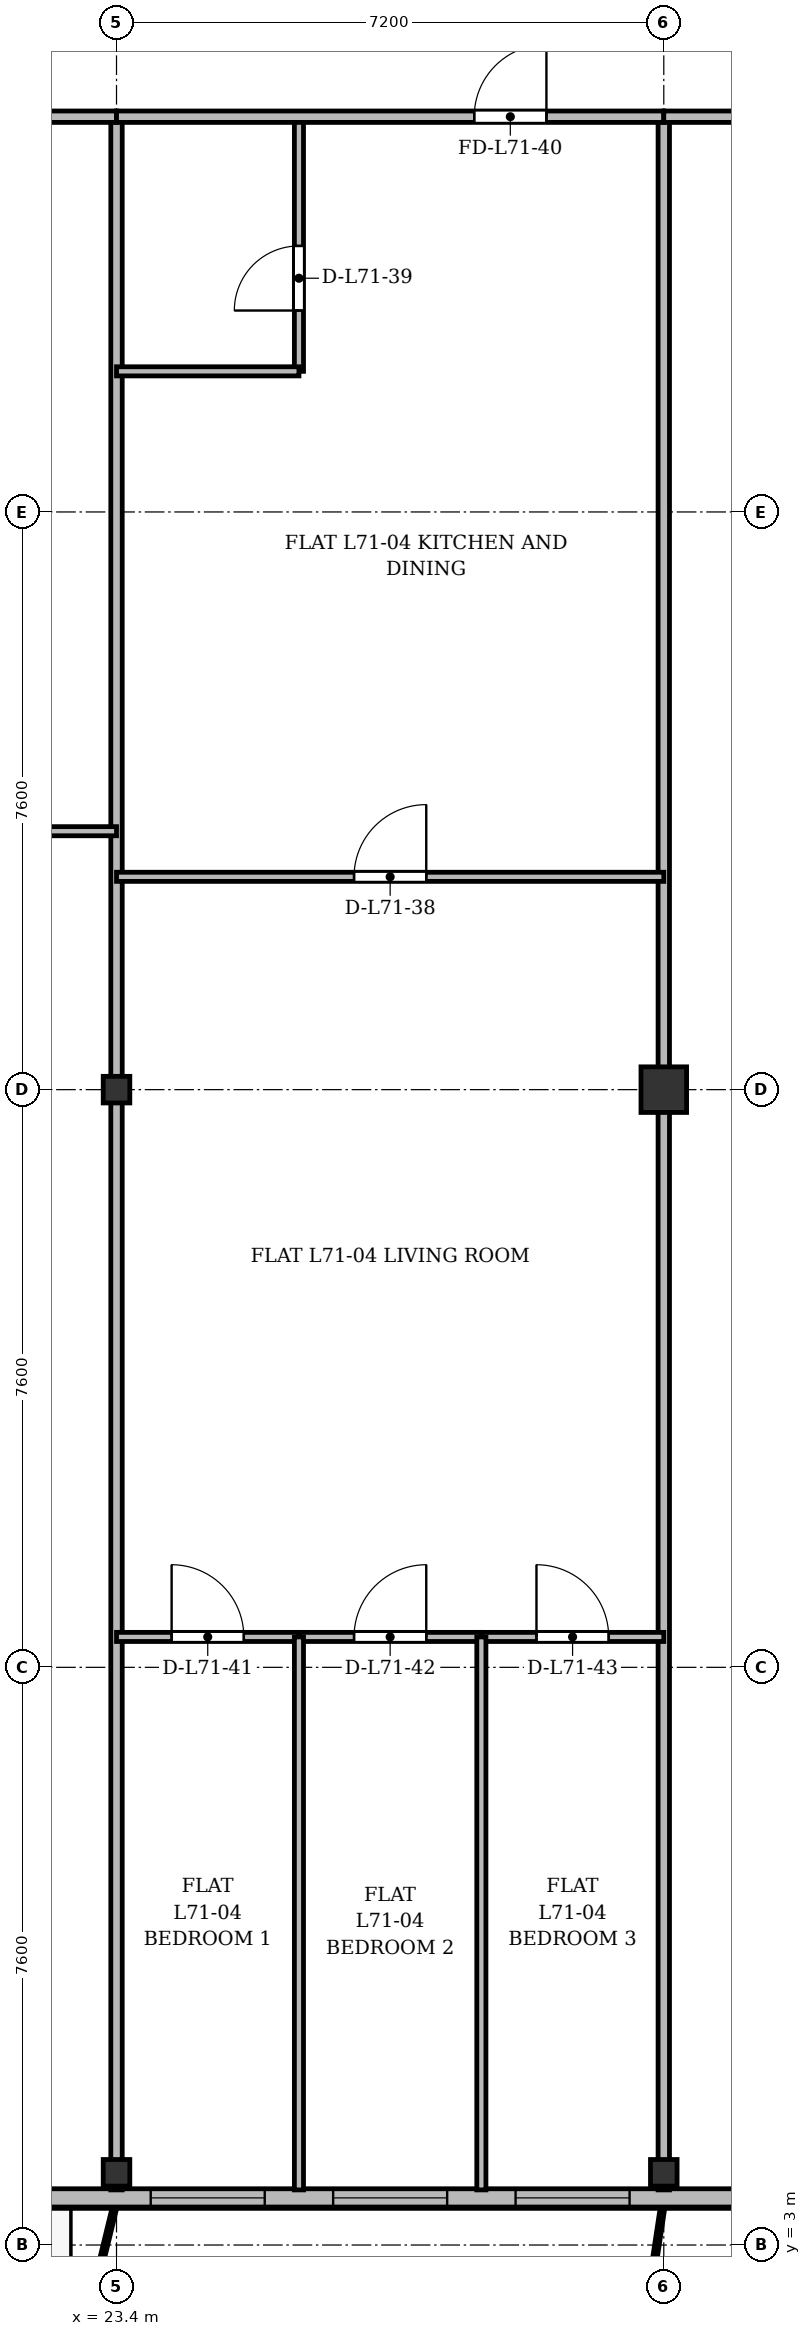
"""IFC4 building model, lengths in metres.
Left out: names, types, materials, properties, quantities, classifications, styles, units other than length and angle.
Written with IfcOpenShell. Run it as: python <this file> out.ifc"""

import sys

from ifc_helpers import new_model, si_unit, direction, frame, frame_2d, origin, origin_2d, place, context, subcontext, project, spatial, rectangle, i_section, extrude, source, transform, mapped, element, fill, save


model = new_model("IFC4")
c1 = context("Model", 3, precision=1e-05, world=origin(), true_north=direction((0.0, 1.0)))
c2 = subcontext(c1, "Body", "Model", "MODEL_VIEW")
j1 = project(units=[si_unit("LENGTHUNIT", "METRE"), si_unit("PLANEANGLEUNIT", "RADIAN")], contexts=[c1])
p1 = place(None, origin())
s1 = spatial("IfcSite", under=j1, at=p1, CompositionType="ELEMENT")
p2 = place(p1, origin())
s2 = spatial("IfcBuilding", under=s1, at=p2, CompositionType="ELEMENT")
p3 = place(p2, frame((0.0, 0.0, 273.9)))
s3 = spatial("IfcBuildingStorey", under=s2, at=p3, CompositionType="ELEMENT", Elevation=273.9)
m1 = source(origin(), c2, "Body", "SweptSolid", [
    extrude(i_section(OverallWidth=0.35, OverallDepth=0.35, WebThickness=0.018, FlangeThickness=0.028, at=origin_2d()), origin(), (0.0, 0.0, 1.0), 3.6),
])
for number, where, z_axis, x_axis in (
    (1, (23.4, 3.95, 0.0), (0.0, 0.0, 1.0), (1.0, 0.0, 0.0)),
    (2, (23.4, 18.2, 0.0), (0.0, 0.0, 1.0), (1.0, 0.0, 0.0)),
    (3, (30.6, 3.95, 0.0), (0.0, 0.0, 1.0), (1.0, 0.0, 0.0)),
):
    element("IfcColumn", number, at=place(p3, frame(where, z_axis=z_axis, x_axis=x_axis)), inside=s3, PredefinedType="COLUMN", context=c2, shape_type="MappedRepresentation", body=[
        mapped(m1, transform((0.0, 0.0, 0.0), x_axis=(1.0, 0.0, 0.0), y_axis=(0.0, 1.0, 0.0), z_axis=(0.0, 0.0, 1.0), scale=1.0)),
    ])
m2 = source(origin(), c2, "Body", "SweptSolid", [
    extrude(rectangle(XDim=0.6, YDim=0.6, at=origin_2d()), origin(), (0.0, 0.0, 1.0), 3.6),
])
p4 = place(p3, frame((30.6, 18.2, 0.0), z_axis=(0.0, 0.0, 1.0), x_axis=(1.0, 0.0, 0.0)))
e4 = element("IfcColumn", 4, at=p4, inside=s3, PredefinedType="COLUMN", context=c2, shape_type="MappedRepresentation", body=[
    mapped(m2, transform((0.0, 0.0, 0.0), x_axis=(1.0, 0.0, 0.0), y_axis=(0.0, 1.0, 0.0), z_axis=(0.0, 0.0, 1.0), scale=1.0)),
])
p5 = place(p3, frame((63.2, 3.62, 0.0), z_axis=(0.0, 0.0, 1.0), x_axis=(-1.0, 0.0, 0.0)))
e5 = element("IfcWall", 5, at=p5, inside=s3, PredefinedType="SOLIDWALL", context=c2, shape_type="SweptSolid", body=[
    extrude(rectangle(XDim=52.0, YDim=0.24, at=frame_2d((26.0, 0.0))), origin(), (0.0, 0.0, 1.0), 3.37),
])
p6 = place(p5, frame((1.145, 0.0, 0.9)))
e6 = element("IfcOpeningElement", 6, at=p6, cuts=e5, PredefinedType="OPENING", context=c2, shape_type="SweptSolid", body=[
    extrude(rectangle(XDim=2.2, YDim=1.8, at=frame_2d((1.1, 0.9))), frame((0.0, 0.13, 0.0), z_axis=(0.0, -1.0, 0.0), x_axis=(1.0, 0.0, 0.0)), (0.0, 0.0, 1.0), 0.26),
])
p7 = place(p5, frame((5.45, 0.0, 0.9)))
e7 = element("IfcOpeningElement", 7, at=p7, cuts=e5, PredefinedType="OPENING", context=c2, shape_type="SweptSolid", body=[
    extrude(rectangle(XDim=1.5, YDim=1.75, at=frame_2d((0.75, 0.875))), frame((0.0, 0.13, 0.0), z_axis=(0.0, -1.0, 0.0), x_axis=(1.0, 0.0, 0.0)), (0.0, 0.0, 1.0), 0.26),
])
p8 = place(p5, frame((9.1, 0.0, 0.9)))
e8 = element("IfcOpeningElement", 8, at=p8, cuts=e5, PredefinedType="OPENING", context=c2, shape_type="SweptSolid", body=[
    extrude(rectangle(XDim=2.0, YDim=1.95, at=frame_2d((1.0, 0.975))), frame((0.0, 0.13, 0.0), z_axis=(0.0, -1.0, 0.0), x_axis=(1.0, 0.0, 0.0)), (0.0, 0.0, 1.0), 0.26),
])
p9 = place(p5, frame((14.017, 0.0, 0.0)))
e9 = element("IfcOpeningElement", 9, at=p9, cuts=e5, PredefinedType="OPENING", context=c2, shape_type="SweptSolid", body=[
    extrude(rectangle(XDim=1.2, YDim=2.2, at=frame_2d((0.6, 1.1))), frame((0.0, 0.13, 0.0), z_axis=(0.0, -1.0, 0.0), x_axis=(1.0, 0.0, 0.0)), (0.0, 0.0, 1.0), 0.26),
])
p10 = place(p5, frame((25.1, 0.0, 0.9)))
e10 = element("IfcOpeningElement", 10, at=p10, cuts=e5, PredefinedType="OPENING", context=c2, shape_type="SweptSolid", body=[
    extrude(rectangle(XDim=1.8, YDim=1.8, at=frame_2d((0.9, 0.9))), frame((0.0, 0.13, 0.0), z_axis=(0.0, -1.0, 0.0), x_axis=(1.0, 0.0, 0.0)), (0.0, 0.0, 1.0), 0.26),
])
p11 = place(p5, frame((33.05, 0.0, 0.9)))
e11 = element("IfcOpeningElement", 11, at=p11, cuts=e5, PredefinedType="OPENING", context=c2, shape_type="SweptSolid", body=[
    extrude(rectangle(XDim=1.5, YDim=1.75, at=frame_2d((0.75, 0.875))), frame((0.0, 0.13, 0.0), z_axis=(0.0, -1.0, 0.0), x_axis=(1.0, 0.0, 0.0)), (0.0, 0.0, 1.0), 0.26),
])
p12 = place(p5, frame((35.45, 0.0, 0.9)))
e12 = element("IfcOpeningElement", 12, at=p12, cuts=e5, PredefinedType="OPENING", context=c2, shape_type="SweptSolid", body=[
    extrude(rectangle(XDim=1.5, YDim=1.75, at=frame_2d((0.75, 0.875))), frame((0.0, 0.13, 0.0), z_axis=(0.0, -1.0, 0.0), x_axis=(1.0, 0.0, 0.0)), (0.0, 0.0, 1.0), 0.26),
])
p13 = place(p5, frame((37.85, 0.0, 0.9)))
e13 = element("IfcOpeningElement", 13, at=p13, cuts=e5, PredefinedType="OPENING", context=c2, shape_type="SweptSolid", body=[
    extrude(rectangle(XDim=1.5, YDim=1.75, at=frame_2d((0.75, 0.875))), frame((0.0, 0.13, 0.0), z_axis=(0.0, -1.0, 0.0), x_axis=(1.0, 0.0, 0.0)), (0.0, 0.0, 1.0), 0.26),
])
p14 = place(p5, frame((41.452, 0.0, 0.0)))
e14 = element("IfcOpeningElement", 14, at=p14, cuts=e5, PredefinedType="OPENING", context=c2, shape_type="SweptSolid", body=[
    extrude(rectangle(XDim=1.2, YDim=2.2, at=frame_2d((0.6, 1.1))), frame((0.0, 0.13, 0.0), z_axis=(0.0, -1.0, 0.0), x_axis=(1.0, 0.0, 0.0)), (0.0, 0.0, 1.0), 0.26),
])
p15 = place(p5, frame((44.5, 0.0, 0.9)))
e15 = element("IfcOpeningElement", 15, at=p15, cuts=e5, PredefinedType="OPENING", context=c2, shape_type="SweptSolid", body=[
    extrude(rectangle(XDim=1.8, YDim=1.8, at=frame_2d((0.9, 0.9))), frame((0.0, 0.13, 0.0), z_axis=(0.0, -1.0, 0.0), x_axis=(1.0, 0.0, 0.0)), (0.0, 0.0, 1.0), 0.26),
])
p16 = place(p5, frame((48.655, 0.0, 0.9)))
e16 = element("IfcOpeningElement", 16, at=p16, cuts=e5, PredefinedType="OPENING", context=c2, shape_type="SweptSolid", body=[
    extrude(rectangle(XDim=2.2, YDim=1.8, at=frame_2d((1.1, 0.9))), frame((0.0, 0.13, 0.0), z_axis=(0.0, -1.0, 0.0), x_axis=(1.0, 0.0, 0.0)), (0.0, 0.0, 1.0), 0.26),
])
for number, where, z_axis, x_axis in (
    (17, (23.4, 3.725, 0.0), (0.0, 0.0, 1.0), (0.0, 1.0, 0.0)),
    (18, (30.6, 3.725, 0.0), (0.0, 0.0, 1.0), (0.0, 1.0, 0.0)),
):
    element("IfcWall", number, at=place(p3, frame(where, z_axis=z_axis, x_axis=x_axis)), inside=s3, PredefinedType="PARTITIONING", context=c2, shape_type="SweptSolid", body=[
        extrude(rectangle(XDim=27.275, YDim=0.15, at=frame_2d((13.637, 0.0))), origin(), (0.0, 0.0, 1.0), 2.87),
    ])
p17 = place(p3, frame((20.0, 31.0, 0.0), z_axis=(0.0, 0.0, 1.0), x_axis=(1.0, 0.0, 0.0)))
e19 = element("IfcWall", 19, at=p17, inside=s3, PredefinedType="PARTITIONING", context=c2, shape_type="SweptSolid", body=[
    extrude(rectangle(XDim=3.4, YDim=0.15, at=frame_2d((1.7, 0.0))), origin(), (0.0, 0.0, 1.0), 2.87),
])
p18 = place(p17, frame((1.131, 0.0, 0.0)))
e20 = element("IfcOpeningElement", 20, at=p18, cuts=e19, PredefinedType="OPENING", context=c2, shape_type="SweptSolid", body=[
    extrude(rectangle(XDim=0.95, YDim=2.15, at=frame_2d((0.475, 1.075))), frame((0.0, 0.085, 0.0), z_axis=(0.0, -1.0, 0.0), x_axis=(1.0, 0.0, 0.0)), (0.0, 0.0, 1.0), 0.17),
])
p19 = place(p3, frame((20.0, 21.6, 0.0), z_axis=(0.0, 0.0, 1.0), x_axis=(1.0, 0.0, 0.0)))
e21 = element("IfcWall", 21, at=p19, inside=s3, PredefinedType="PARTITIONING", context=c2, shape_type="SweptSolid", body=[
    extrude(rectangle(XDim=3.4, YDim=0.12, at=frame_2d((1.7, 0.0))), origin(), (0.0, 0.0, 1.0), 2.87),
])
p20 = place(p19, frame((1.131, 0.0, 0.0)))
e22 = element("IfcOpeningElement", 22, at=p20, cuts=e21, PredefinedType="OPENING", context=c2, shape_type="SweptSolid", body=[
    extrude(rectangle(XDim=0.95, YDim=2.15, at=frame_2d((0.475, 1.075))), frame((0.0, 0.07, 0.0), z_axis=(0.0, -1.0, 0.0), x_axis=(1.0, 0.0, 0.0)), (0.0, 0.0, 1.0), 0.14),
])
p21 = place(p3, frame((23.4, 21.0, 0.0), z_axis=(0.0, 0.0, 1.0), x_axis=(1.0, 0.0, 0.0)))
e23 = element("IfcWall", 23, at=p21, inside=s3, PredefinedType="PARTITIONING", context=c2, shape_type="SweptSolid", body=[
    extrude(rectangle(XDim=7.2, YDim=0.12, at=frame_2d((3.6, 0.0))), origin(), (0.0, 0.0, 1.0), 2.87),
])
p22 = place(p21, frame((3.125, 0.0, 0.0)))
e24 = element("IfcOpeningElement", 24, at=p22, cuts=e23, PredefinedType="OPENING", context=c2, shape_type="SweptSolid", body=[
    extrude(rectangle(XDim=0.95, YDim=2.15, at=frame_2d((0.475, 1.075))), frame((0.0, 0.07, 0.0), z_axis=(0.0, -1.0, 0.0), x_axis=(1.0, 0.0, 0.0)), (0.0, 0.0, 1.0), 0.14),
])
p23 = place(p3, frame((25.8, 27.65, 0.0), z_axis=(0.0, 0.0, 1.0), x_axis=(0.0, 1.0, 0.0)))
e25 = element("IfcWall", 25, at=p23, inside=s3, PredefinedType="PARTITIONING", context=c2, shape_type="SweptSolid", body=[
    extrude(rectangle(XDim=3.35, YDim=0.12, at=frame_2d((1.675, 0.0))), origin(), (0.0, 0.0, 1.0), 3.37),
])
p24 = place(p23, frame((0.8, 0.0, 0.0)))
e26 = element("IfcOpeningElement", 26, at=p24, cuts=e25, PredefinedType="OPENING", context=c2, shape_type="SweptSolid", body=[
    extrude(rectangle(XDim=0.85, YDim=2.1, at=frame_2d((0.425, 1.05))), frame((0.0, 0.07, 0.0), z_axis=(0.0, -1.0, 0.0), x_axis=(1.0, 0.0, 0.0)), (0.0, 0.0, 1.0), 0.14),
])
p25 = place(p3, frame((23.4, 27.65, 0.0), z_axis=(0.0, 0.0, 1.0), x_axis=(1.0, 0.0, 0.0)))
e27 = element("IfcWall", 27, at=p25, inside=s3, PredefinedType="PARTITIONING", context=c2, shape_type="SweptSolid", body=[
    extrude(rectangle(XDim=2.4, YDim=0.12, at=frame_2d((1.2, 0.0))), origin(), (0.0, 0.0, 1.0), 2.87),
])
p26 = place(p3, frame((23.4, 31.0, 0.0), z_axis=(0.0, 0.0, 1.0), x_axis=(1.0, 0.0, 0.0)))
e28 = element("IfcWall", 28, at=p26, inside=s3, PredefinedType="PARTITIONING", context=c2, shape_type="SweptSolid", body=[
    extrude(rectangle(XDim=7.2, YDim=0.15, at=frame_2d((3.6, 0.0))), origin(), (0.0, 0.0, 1.0), 2.87),
])
p27 = place(p26, frame((4.706, 0.0, 0.0)))
e29 = element("IfcOpeningElement", 29, at=p27, cuts=e28, PredefinedType="OPENING", context=c2, shape_type="SweptSolid", body=[
    extrude(rectangle(XDim=0.95, YDim=2.15, at=frame_2d((0.475, 1.075))), frame((0.0, 0.085, 0.0), z_axis=(0.0, -1.0, 0.0), x_axis=(1.0, 0.0, 0.0)), (0.0, 0.0, 1.0), 0.17),
])
p28 = place(p3, frame((23.4, 11.0, 0.0), z_axis=(0.0, 0.0, 1.0), x_axis=(1.0, 0.0, 0.0)))
e30 = element("IfcWall", 30, at=p28, inside=s3, PredefinedType="PARTITIONING", context=c2, shape_type="SweptSolid", body=[
    extrude(rectangle(XDim=2.4, YDim=0.12, at=frame_2d((1.2, 0.0))), origin(), (0.0, 0.0, 1.0), 2.87),
])
p29 = place(p28, frame((0.725, 0.0, 0.0)))
e31 = element("IfcOpeningElement", 31, at=p29, cuts=e30, PredefinedType="OPENING", context=c2, shape_type="SweptSolid", body=[
    extrude(rectangle(XDim=0.95, YDim=2.15, at=frame_2d((0.475, 1.075))), frame((0.0, 0.07, 0.0), z_axis=(0.0, -1.0, 0.0), x_axis=(1.0, 0.0, 0.0)), (0.0, 0.0, 1.0), 0.14),
])
p30 = place(p3, frame((25.8, 11.0, 0.0), z_axis=(0.0, 0.0, 1.0), x_axis=(1.0, 0.0, 0.0)))
e32 = element("IfcWall", 32, at=p30, inside=s3, PredefinedType="PARTITIONING", context=c2, shape_type="SweptSolid", body=[
    extrude(rectangle(XDim=2.4, YDim=0.12, at=frame_2d((1.2, 0.0))), origin(), (0.0, 0.0, 1.0), 3.07),
])
p31 = place(p30, frame((0.725, 0.0, 0.0)))
e33 = element("IfcOpeningElement", 33, at=p31, cuts=e32, PredefinedType="OPENING", context=c2, shape_type="SweptSolid", body=[
    extrude(rectangle(XDim=0.95, YDim=2.15, at=frame_2d((0.475, 1.075))), frame((0.0, 0.07, 0.0), z_axis=(0.0, -1.0, 0.0), x_axis=(1.0, 0.0, 0.0)), (0.0, 0.0, 1.0), 0.14),
])
p32 = place(p3, frame((25.8, 3.725, 0.0), z_axis=(0.0, 0.0, 1.0), x_axis=(0.0, 1.0, 0.0)))
e34 = element("IfcWall", 34, at=p32, inside=s3, PredefinedType="PARTITIONING", context=c2, shape_type="SweptSolid", body=[
    extrude(rectangle(XDim=7.275, YDim=0.12, at=frame_2d((3.637, 0.0))), origin(), (0.0, 0.0, 1.0), 2.92),
])
p33 = place(p3, frame((28.2, 11.0, 0.0), z_axis=(0.0, 0.0, 1.0), x_axis=(1.0, 0.0, 0.0)))
e35 = element("IfcWall", 35, at=p33, inside=s3, PredefinedType="PARTITIONING", context=c2, shape_type="SweptSolid", body=[
    extrude(rectangle(XDim=2.4, YDim=0.12, at=frame_2d((1.2, 0.0))), origin(), (0.0, 0.0, 1.0), 2.87),
])
p34 = place(p33, frame((0.725, 0.0, 0.0)))
e36 = element("IfcOpeningElement", 36, at=p34, cuts=e35, PredefinedType="OPENING", context=c2, shape_type="SweptSolid", body=[
    extrude(rectangle(XDim=0.95, YDim=2.15, at=frame_2d((0.475, 1.075))), frame((0.0, 0.07, 0.0), z_axis=(0.0, -1.0, 0.0), x_axis=(1.0, 0.0, 0.0)), (0.0, 0.0, 1.0), 0.14),
])
p35 = place(p3, frame((28.2, 3.725, 0.0), z_axis=(0.0, 0.0, 1.0), x_axis=(0.0, 1.0, 0.0)))
e37 = element("IfcWall", 37, at=p35, inside=s3, PredefinedType="PARTITIONING", context=c2, shape_type="SweptSolid", body=[
    extrude(rectangle(XDim=7.275, YDim=0.12, at=frame_2d((3.637, 0.0))), origin(), (0.0, 0.0, 1.0), 2.92),
])
p36 = place(p3, frame((30.6, 31.0, 0.0), z_axis=(0.0, 0.0, 1.0), x_axis=(1.0, 0.0, 0.0)))
e38 = element("IfcWall", 38, at=p36, inside=s3, PredefinedType="PARTITIONING", context=c2, shape_type="SweptSolid", body=[
    extrude(rectangle(XDim=13.2, YDim=0.15, at=frame_2d((6.6, 0.0))), origin(), (0.0, 0.0, 1.0), 2.87),
])
p37 = place(p36, frame((5.8, 0.0, 0.0)))
e39 = element("IfcOpeningElement", 39, at=p37, cuts=e38, PredefinedType="OPENING", context=c2, shape_type="SweptSolid", body=[
    extrude(rectangle(XDim=1.6, YDim=2.2, at=frame_2d((0.8, 1.1))), frame((0.0, 0.085, 0.0), z_axis=(0.0, -1.0, 0.0), x_axis=(1.0, 0.0, 0.0)), (0.0, 0.0, 1.0), 0.17),
])
m3 = source(origin(), c2, "Body", "SweptSolid", [
    extrude(rectangle(XDim=1.5, YDim=1.75, at=frame_2d((0.75, 0.875))), frame((0.0, 0.03, 0.0), z_axis=(0.0, -1.0, 0.0), x_axis=(1.0, 0.0, 0.0)), (0.0, 0.0, 1.0), 0.06),
])
p38 = place(p11, origin())
e40 = element("IfcWindow", 40, at=p38, inside=s3, PartitioningType="SINGLE_PANEL", PredefinedType="WINDOW", context=c2, shape_type="MappedRepresentation", body=[
    mapped(m3, transform((0.0, 0.0, 0.0), x_axis=(1.0, 0.0, 0.0), y_axis=(0.0, 1.0, 0.0), z_axis=(0.0, 0.0, 1.0), scale=1.0)),
])
fill(e11, e40)
p39 = place(p12, origin())
e41 = element("IfcWindow", 41, at=p39, inside=s3, PartitioningType="SINGLE_PANEL", PredefinedType="WINDOW", context=c2, shape_type="MappedRepresentation", body=[
    mapped(m3, transform((0.0, 0.0, 0.0), x_axis=(1.0, 0.0, 0.0), y_axis=(0.0, 1.0, 0.0), z_axis=(0.0, 0.0, 1.0), scale=1.0)),
])
fill(e12, e41)
p40 = place(p13, origin())
e42 = element("IfcWindow", 42, at=p40, inside=s3, PartitioningType="SINGLE_PANEL", PredefinedType="WINDOW", context=c2, shape_type="MappedRepresentation", body=[
    mapped(m3, transform((0.0, 0.0, 0.0), x_axis=(1.0, 0.0, 0.0), y_axis=(0.0, 1.0, 0.0), z_axis=(0.0, 0.0, 1.0), scale=1.0)),
])
fill(e13, e42)
m4 = source(origin(), c2, "Body", "SweptSolid", [
    extrude(rectangle(XDim=0.95, YDim=2.15, at=frame_2d((0.475, 1.075))), frame((0.0, 0.025, 0.0), z_axis=(0.0, -1.0, 0.0), x_axis=(1.0, 0.0, 0.0)), (0.0, 0.0, 1.0), 0.05),
])
p41 = place(p22, origin())
e43 = element("IfcDoor", 43, at=p41, inside=s3, OperationType="SINGLE_SWING_RIGHT", PredefinedType="DOOR", context=c2, shape_type="MappedRepresentation", body=[
    mapped(m4, transform((0.0, 0.0, 0.0), x_axis=(1.0, 0.0, 0.0), y_axis=(0.0, 1.0, 0.0), z_axis=(0.0, 0.0, 1.0), scale=1.0)),
])
fill(e24, e43)
m5 = source(origin(), c2, "Body", "SweptSolid", [
    extrude(rectangle(XDim=0.85, YDim=2.1, at=frame_2d((0.425, 1.05))), frame((0.0, 0.025, 0.0), z_axis=(0.0, -1.0, 0.0), x_axis=(1.0, 0.0, 0.0)), (0.0, 0.0, 1.0), 0.05),
])
p42 = place(p24, origin())
e44 = element("IfcDoor", 44, at=p42, inside=s3, OperationType="SINGLE_SWING_LEFT", PredefinedType="DOOR", context=c2, shape_type="MappedRepresentation", body=[
    mapped(m5, transform((0.0, 0.0, 0.0), x_axis=(1.0, 0.0, 0.0), y_axis=(0.0, 1.0, 0.0), z_axis=(0.0, 0.0, 1.0), scale=1.0)),
])
fill(e26, e44)
p43 = place(p27, origin())
e45 = element("IfcDoor", 45, at=p43, inside=s3, OperationType="SINGLE_SWING_RIGHT", PredefinedType="DOOR", context=c2, shape_type="MappedRepresentation", body=[
    mapped(m4, transform((0.0, 0.0, 0.0), x_axis=(1.0, 0.0, 0.0), y_axis=(0.0, 1.0, 0.0), z_axis=(0.0, 0.0, 1.0), scale=1.0)),
])
fill(e29, e45)
p44 = place(p29, origin())
e46 = element("IfcDoor", 46, at=p44, inside=s3, OperationType="SINGLE_SWING_LEFT", PredefinedType="DOOR", context=c2, shape_type="MappedRepresentation", body=[
    mapped(m4, transform((0.0, 0.0, 0.0), x_axis=(1.0, 0.0, 0.0), y_axis=(0.0, 1.0, 0.0), z_axis=(0.0, 0.0, 1.0), scale=1.0)),
])
fill(e31, e46)
p45 = place(p31, origin())
e47 = element("IfcDoor", 47, at=p45, inside=s3, OperationType="SINGLE_SWING_RIGHT", PredefinedType="DOOR", context=c2, shape_type="MappedRepresentation", body=[
    mapped(m4, transform((0.0, 0.0, 0.0), x_axis=(1.0, 0.0, 0.0), y_axis=(0.0, 1.0, 0.0), z_axis=(0.0, 0.0, 1.0), scale=1.0)),
])
fill(e33, e47)
p46 = place(p34, origin())
e48 = element("IfcDoor", 48, at=p46, inside=s3, OperationType="SINGLE_SWING_LEFT", PredefinedType="DOOR", context=c2, shape_type="MappedRepresentation", body=[
    mapped(m4, transform((0.0, 0.0, 0.0), x_axis=(1.0, 0.0, 0.0), y_axis=(0.0, 1.0, 0.0), z_axis=(0.0, 0.0, 1.0), scale=1.0)),
])
fill(e36, e48)
save(model, sys.argv[1])
